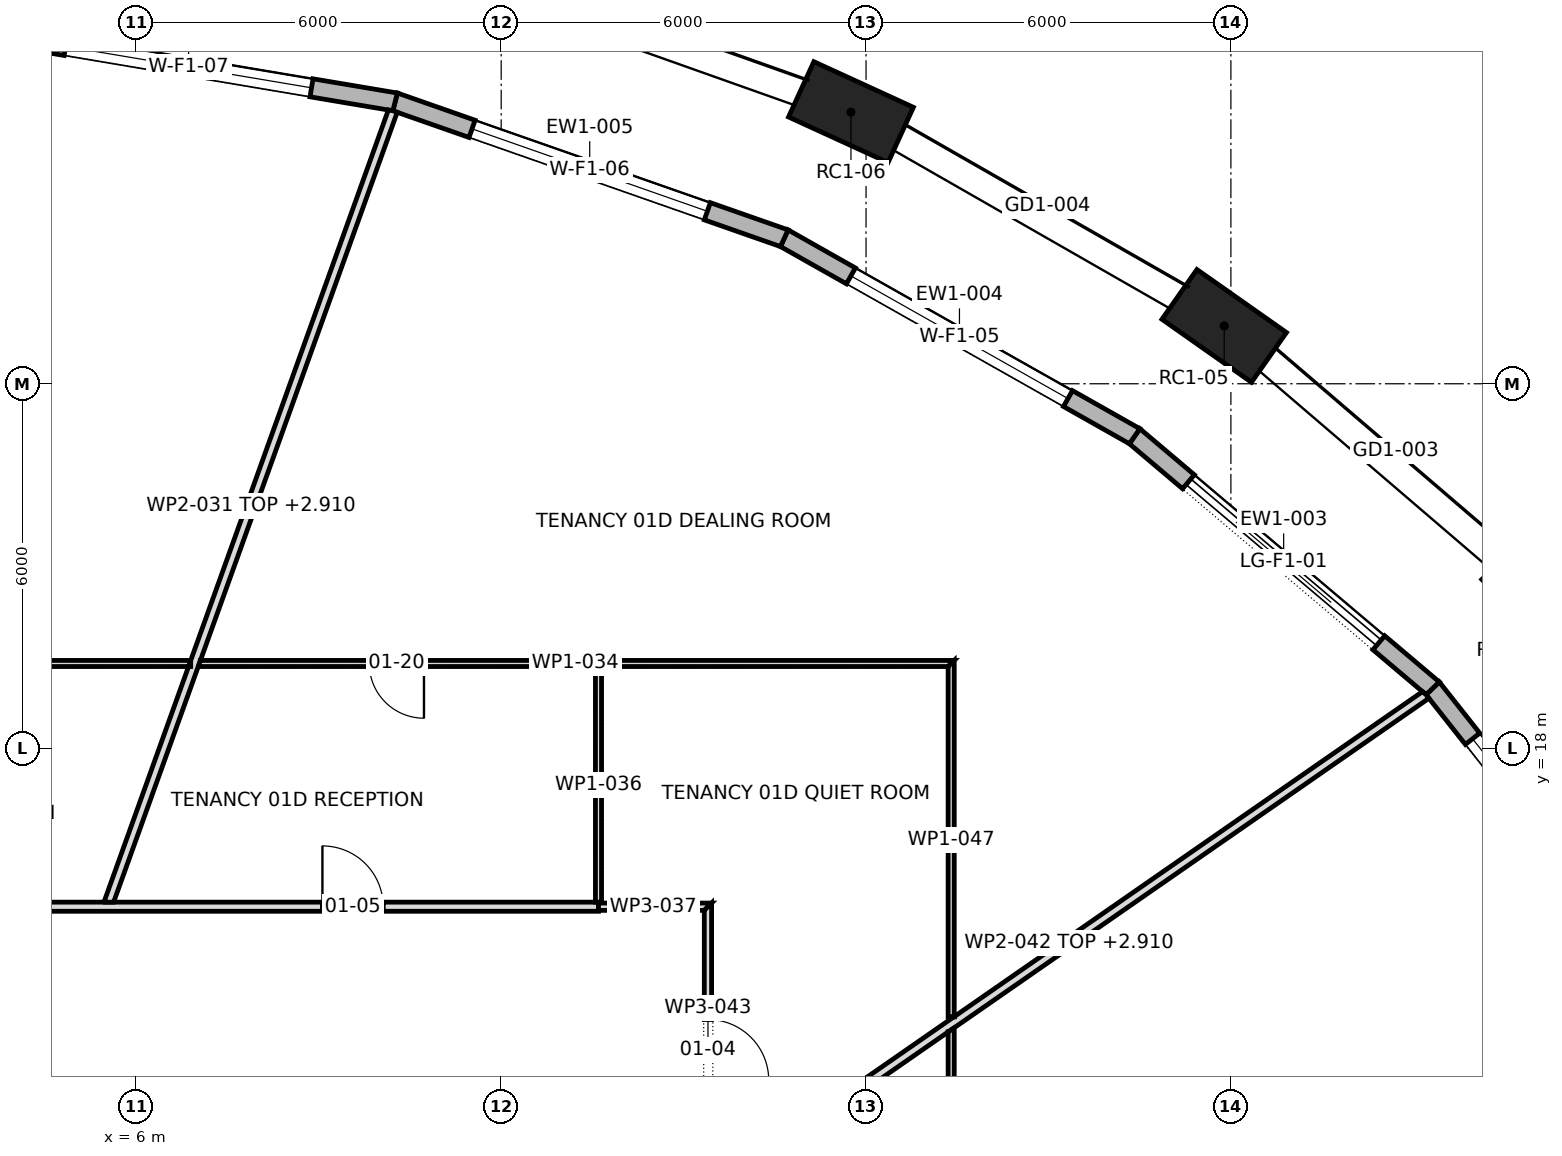
"""IFC4 building model, lengths in metres.
Left out: names, types, materials, properties, quantities, classifications, styles, units other than length and angle.
Written with IfcOpenShell. Run it as: python <this file> out.ifc"""

import sys

from ifc_helpers import new_model, si_unit, direction, frame, frame_2d, origin, origin_2d, place, context, subcontext, project, spatial, polyline, rectangle, outline, extrude, element, fill, save


model = new_model("IFC4")
c1 = context("Model", 3, precision=1e-05, world=origin(), true_north=direction((0.0, 1.0)))
c2 = subcontext(c1, "Body", "Model", "MODEL_VIEW")
j1 = project(units=[si_unit("LENGTHUNIT", "METRE"), si_unit("PLANEANGLEUNIT", "RADIAN")], contexts=[c1])
p1 = place(None, origin())
s1 = spatial("IfcSite", under=j1, at=p1, CompositionType="ELEMENT")
p2 = place(p1, origin())
s2 = spatial("IfcBuilding", under=s1, at=p2, CompositionType="ELEMENT")
p3 = place(p2, frame((0.0, 0.0, 31.9)))
s3 = spatial("IfcBuildingStorey", under=s2, at=p3, CompositionType="ELEMENT", Elevation=31.9)
for number, where, z_axis, x_axis in (
    (1, (29.11, 20.477, 0.0), (0.0, 0.0, 1.0), (-0.692, 0.722, 0.0)),
    (2, (23.89, 24.951, 0.0), (0.0, 0.0, 1.0), (-0.818, 0.575, 0.0)),
    (3, (17.752, 28.467, 0.0), (0.0, 0.0, 1.0), (-0.909, 0.417, 0.0)),
):
    element("IfcColumn", number, at=place(p3, frame(where, z_axis=z_axis, x_axis=x_axis)), inside=s3, PredefinedType="COLUMN", context=c2, shape_type="SweptSolid", body=[
        extrude(rectangle(XDim=1.8, YDim=1.0, at=origin_2d()), origin(), (0.0, 0.0, 1.0), 4.2),
    ])
p4 = place(p3, frame((31.171, 14.115, 0.0), z_axis=(0.0, 0.0, 1.0), x_axis=(-0.619902786528, 0.784678619089, 0.0)))
e4 = element("IfcWall", 4, at=p4, inside=s3, PredefinedType="STANDARD", context=c2, shape_type="SweptSolid", body=[
    extrude(outline(polyline([(-0.016, -0.15), (6.231, -0.15), (6.2, 0.15), (0.016, 0.15), (-0.016, -0.15)])), origin(), (0.0, 0.0, 1.0), 3.9),
])
p5 = place(p4, frame((1.058, 0.0, 0.6)))
e5 = element("IfcOpeningElement", 5, at=p5, cuts=e4, PredefinedType="OPENING", context=c2, shape_type="SweptSolid", body=[
    extrude(rectangle(XDim=4.1, YDim=2.85, at=frame_2d((2.05, 1.425))), frame((0.0, 0.162, 0.0), z_axis=(0.0, -1.0, 0.0), x_axis=(1.0, 0.0, 0.0)), (0.0, 0.0, 1.0), 0.324),
])
p6 = place(p3, frame((27.318, 18.992, 0.0), z_axis=(0.0, 0.0, 1.0), x_axis=(-0.763540615407, 0.645759807223, 0.0)))
e6 = element("IfcWall", 6, at=p6, inside=s3, PredefinedType="STANDARD", context=c2, shape_type="SweptSolid", body=[
    extrude(outline(polyline([(-0.015, -0.15), (6.434, -0.15), (6.406, 0.15), (0.015, 0.15), (-0.015, -0.15)])), origin(), (0.0, 0.0, 1.0), 3.9),
])
p7 = place(p6, frame((1.16, 0.0, 0.0)))
e7 = element("IfcOpeningElement", 7, at=p7, cuts=e6, PredefinedType="OPENING", context=c2, shape_type="SweptSolid", body=[
    extrude(rectangle(XDim=4.1, YDim=3.45, at=frame_2d((2.05, 1.725))), frame((0.0, 0.162, 0.0), z_axis=(0.0, -1.0, 0.0), x_axis=(1.0, 0.0, 0.0)), (0.0, 0.0, 1.0), 0.324),
])
p8 = place(p3, frame((22.417, 23.137, 0.0), z_axis=(0.0, 0.0, 1.0), x_axis=(-0.8705786416, 0.492029296678, 0.0)))
e8 = element("IfcWall", 8, at=p8, inside=s3, PredefinedType="STANDARD", context=c2, shape_type="SweptSolid", body=[
    extrude(outline(polyline([(-0.014, -0.15), (6.631, -0.15), (6.604, 0.15), (0.014, 0.15), (-0.014, -0.15)])), origin(), (0.0, 0.0, 1.0), 3.9),
])
p9 = place(p8, frame((1.259, 0.0, 0.6)))
e9 = element("IfcOpeningElement", 9, at=p9, cuts=e8, PredefinedType="OPENING", context=c2, shape_type="SweptSolid", body=[
    extrude(rectangle(XDim=4.1, YDim=2.85, at=frame_2d((2.05, 1.425))), frame((0.0, 0.162, 0.0), z_axis=(0.0, -1.0, 0.0), x_axis=(1.0, 0.0, 0.0)), (0.0, 0.0, 1.0), 0.324),
])
p10 = place(p3, frame((16.656, 26.393, 0.0), z_axis=(0.0, 0.0, 1.0), x_axis=(-0.943767392455, 0.330610206947, 0.0)))
e10 = element("IfcWall", 10, at=p10, inside=s3, PredefinedType="STANDARD", context=c2, shape_type="SweptSolid", body=[
    extrude(outline(polyline([(-0.013, -0.15), (6.794, -0.15), (6.769, 0.15), (0.013, 0.15), (-0.013, -0.15)])), origin(), (0.0, 0.0, 1.0), 3.9),
])
p11 = place(p10, frame((1.341, 0.0, 0.6)))
e11 = element("IfcOpeningElement", 11, at=p11, cuts=e10, PredefinedType="OPENING", context=c2, shape_type="SweptSolid", body=[
    extrude(rectangle(XDim=4.1, YDim=2.85, at=frame_2d((2.05, 1.425))), frame((0.0, 0.162, 0.0), z_axis=(0.0, -1.0, 0.0), x_axis=(1.0, 0.0, 0.0)), (0.0, 0.0, 1.0), 0.324),
])
p12 = place(p3, frame((10.256, 28.635, 0.0), z_axis=(0.0, 0.0, 1.0), x_axis=(-0.986141805867, 0.165904607291, 0.0)))
e12 = element("IfcWall", 12, at=p12, inside=s3, PredefinedType="STANDARD", context=c2, shape_type="SweptSolid", body=[
    extrude(outline(polyline([(-0.013, -0.15), (6.901, -0.15), (6.876, 0.15), (0.013, 0.15), (-0.013, -0.15)])), origin(), (0.0, 0.0, 1.0), 3.9),
])
p13 = place(p12, frame((1.394, 0.0, 0.6)))
e13 = element("IfcOpeningElement", 13, at=p13, cuts=e12, PredefinedType="OPENING", context=c2, shape_type="SweptSolid", body=[
    extrude(rectangle(XDim=4.1, YDim=2.85, at=frame_2d((2.05, 1.425))), frame((0.0, 0.162, 0.0), z_axis=(0.0, -1.0, 0.0), x_axis=(1.0, 0.0, 0.0)), (0.0, 0.0, 1.0), 0.324),
])
p14 = place(p3, frame((-12.2, 19.4, 0.0), z_axis=(0.0, 0.0, 1.0), x_axis=(1.0, 0.0, 0.0)))
e14 = element("IfcWall", 14, at=p14, inside=s3, PredefinedType="PARTITIONING", context=c2, shape_type="SweptSolid", body=[
    extrude(outline(polyline([(0.063, -0.05), (1.754, -0.05), (3.446, -0.05), (5.137, -0.05), (6.829, -0.05), (8.52, -0.05), (8.52, -0.05), (8.62, -0.05), (8.62, -0.05), (10.36, -0.05), (12.099, -0.05), (13.839, -0.05), (15.579, -0.05), (17.319, -0.05), (19.058, -0.05), (19.094, 0.049), (19.094, 0.05), (17.185, 0.05), (15.275, 0.05), (13.366, 0.05), (11.456, 0.05), (9.547, 0.05), (7.638, 0.05), (5.728, 0.05), (3.819, 0.05), (1.909, 0.05), (0.0, 0.05), (0.0, 0.05), (0.063, -0.05)])), origin(), (0.0, 0.0, 1.0), 3.9),
])
p15 = place(p14, frame((13.415, 0.0, 0.0)))
e15 = element("IfcOpeningElement", 15, at=p15, cuts=e14, PredefinedType="OPENING", context=c2, shape_type="SweptSolid", body=[
    extrude(rectangle(XDim=0.9, YDim=2.1, at=frame_2d((0.45, 1.05))), frame((0.0, 0.062, 0.0), z_axis=(0.0, -1.0, 0.0), x_axis=(1.0, 0.0, 0.0)), (0.0, 0.0, 1.0), 0.124),
])
p16 = place(p3, frame((-9.73, 15.4, 0.0), z_axis=(0.0, 0.0, 1.0), x_axis=(1.0, 0.0, 0.0)))
e16 = element("IfcWall", 16, at=p16, inside=s3, PredefinedType="PARTITIONING", context=c2, shape_type="SweptSolid", body=[
    extrude(rectangle(XDim=23.33, YDim=0.15, at=frame_2d((11.665, 0.0))), origin(), (0.0, 0.0, 1.0), 3.9),
])
p17 = place(p16, frame((18.79, 0.0, 0.0)))
e17 = element("IfcOpeningElement", 17, at=p17, cuts=e16, PredefinedType="OPENING", context=c2, shape_type="SweptSolid", body=[
    extrude(rectangle(XDim=1.0, YDim=2.1, at=frame_2d((0.5, 1.05))), frame((0.0, 0.087, 0.0), z_axis=(0.0, -1.0, 0.0), x_axis=(1.0, 0.0, 0.0)), (0.0, 0.0, 1.0), 0.174),
])
p18 = place(p16, frame((10.175, 0.0, 0.0)))
e18 = element("IfcOpeningElement", 18, at=p18, cuts=e16, PredefinedType="OPENING", context=c2, shape_type="SweptSolid", body=[
    extrude(rectangle(XDim=1.0, YDim=2.1, at=frame_2d((0.5, 1.05))), frame((0.0, 0.087, 0.0), z_axis=(0.0, -1.0, 0.0), x_axis=(1.0, 0.0, 0.0)), (0.0, 0.0, 1.0), 0.174),
])
p19 = place(p16, frame((2.55, 0.0, 0.0)))
e19 = element("IfcOpeningElement", 19, at=p19, cuts=e16, PredefinedType="OPENING", context=c2, shape_type="SweptSolid", body=[
    extrude(rectangle(XDim=1.0, YDim=2.1, at=frame_2d((0.5, 1.05))), frame((0.0, 0.087, 0.0), z_axis=(0.0, -1.0, 0.0), x_axis=(1.0, 0.0, 0.0)), (0.0, 0.0, 1.0), 0.174),
])
p20 = place(p3, frame((5.538, 15.45, 0.0), z_axis=(0.0, 0.0, 1.0), x_axis=(0.337914385466, 0.94117685272, 0.0)))
e20 = element("IfcWall", 20, at=p20, inside=s3, PredefinedType="PARTITIONING", context=c2, shape_type="SweptSolid", body=[
    extrude(outline(polyline([(0.053, -0.075), (1.46, -0.075), (2.867, -0.075), (4.274, -0.075), (4.277, -0.074), (4.277, -0.075), (6.192, -0.075), (8.108, -0.075), (10.023, -0.075), (11.939, -0.075), (13.854, -0.075), (13.854, -0.063), (13.854, 0.001), (13.841, 0.075), (11.917, 0.075), (9.993, 0.075), (8.07, 0.075), (6.146, 0.075), (4.222, 0.075), (4.129, 0.042), (4.117, 0.075), (2.745, 0.075), (1.372, 0.075), (0.0, 0.075), (0.0, 0.074), (0.053, -0.075)])), origin(), (0.0, 0.0, 1.0), 2.91),
])
p21 = place(p3, frame((7.018, 19.4, 0.0), z_axis=(0.0, 0.0, 1.0), x_axis=(1.0, 0.0, 0.0)))
e21 = element("IfcWall", 21, at=p21, inside=s3, PredefinedType="PARTITIONING", context=c2, shape_type="SweptSolid", body=[
    extrude(outline(polyline([(0.0, -0.05), (1.633, -0.05), (3.266, -0.05), (4.899, -0.05), (6.532, -0.05), (6.532, -0.05), (6.632, -0.05), (6.632, -0.05), (8.532, -0.05), (10.432, -0.05), (12.332, -0.05), (12.332, -0.05), (12.432, 0.05), (10.661, 0.05), (8.89, 0.05), (7.119, 0.05), (5.348, 0.05), (3.577, 0.05), (1.807, 0.05), (0.036, 0.05), (0.0, -0.049), (0.0, -0.05)])), origin(), (0.0, 0.0, 1.0), 3.9),
])
p22 = place(p21, frame((2.812, 0.0, 0.0)))
e22 = element("IfcOpeningElement", 22, at=p22, cuts=e21, PredefinedType="OPENING", context=c2, shape_type="SweptSolid", body=[
    extrude(rectangle(XDim=0.9, YDim=2.1, at=frame_2d((0.45, 1.05))), frame((0.0, 0.062, 0.0), z_axis=(0.0, -1.0, 0.0), x_axis=(1.0, 0.0, 0.0)), (0.0, 0.0, 1.0), 0.124),
])
p23 = place(p3, frame((13.6, 15.46, 0.0), z_axis=(0.0, 0.0, 1.0), x_axis=(0.0, 1.0, 0.0)))
e23 = element("IfcWall", 23, at=p23, inside=s3, PredefinedType="PARTITIONING", context=c2, shape_type="SweptSolid", body=[
    extrude(outline(polyline([(0.0, -0.05), (1.945, -0.05), (3.89, -0.05), (3.89, 0.05), (1.952, 0.05), (0.015, 0.05), (0.015, 0.0), (0.0, 0.0), (0.0, -0.05)])), origin(), (0.0, 0.0, 1.0), 3.9),
])
p24 = place(p3, frame((13.6, 15.4, 0.0), z_axis=(0.0, 0.0, 1.0), x_axis=(1.0, 0.0, 0.0)))
e24 = element("IfcWall", 24, at=p24, inside=s3, PredefinedType="PARTITIONING", context=c2, shape_type="SweptSolid", body=[
    extrude(outline(polyline([(0.0, -0.06), (1.74, -0.06), (1.86, 0.06), (0.0, 0.06), (0.0, -0.06)])), origin(), (0.0, 0.0, 1.0), 3.9),
])
p25 = place(p3, frame((15.433, 10.712, 0.0), z_axis=(0.0, 0.0, 1.0), x_axis=(0.82152236589, 0.570176290583, 0.0)))
e25 = element("IfcWall", 25, at=p25, inside=s3, PredefinedType="PARTITIONING", context=c2, shape_type="SweptSolid", body=[
    extrude(outline(polyline([(0.0, -0.075), (1.572, -0.075), (3.144, -0.075), (4.716, -0.075), (4.718, -0.073), (4.721, -0.075), (6.645, -0.075), (8.569, -0.075), (10.493, -0.075), (12.417, -0.075), (14.341, -0.075), (14.341, -0.074), (14.336, 0.0), (14.316, 0.075), (12.441, 0.075), (10.567, 0.075), (8.692, 0.075), (6.817, 0.075), (4.942, 0.075), (4.941, 0.073), (4.939, 0.075), (3.321, 0.075), (1.703, 0.075), (0.085, 0.075), (0.01, -0.034), (0.022, -0.042), (0.0, -0.074), (0.0, -0.075)])), origin(), (0.0, 0.0, 1.0), 2.91),
])
p26 = place(p3, frame((15.4, 15.46, 0.0), z_axis=(0.0, 0.0, 1.0), x_axis=(0.0, -1.0, 0.0)))
e26 = element("IfcWall", 26, at=p26, inside=s3, PredefinedType="PARTITIONING", context=c2, shape_type="SweptSolid", body=[
    extrude(outline(polyline([(4.77, 0.06), (3.18, 0.06), (1.59, 0.06), (0.0, 0.06), (0.12, -0.06), (1.67, -0.06), (3.22, -0.06), (4.77, -0.06), (4.77, 0.06)])), origin(), (0.0, 0.0, 1.0), 3.9),
])
p27 = place(p26, frame((1.915, 0.0, 0.0)))
e27 = element("IfcOpeningElement", 27, at=p27, cuts=e26, PredefinedType="OPENING", context=c2, shape_type="SweptSolid", body=[
    extrude(rectangle(XDim=1.0, YDim=2.1, at=frame_2d((0.5, 1.05))), frame((0.0, 0.072, 0.0), z_axis=(0.0, -1.0, 0.0), x_axis=(1.0, 0.0, 0.0)), (0.0, 0.0, 1.0), 0.144),
])
p28 = place(p3, frame((19.4, 13.409, 0.0), z_axis=(0.0, 0.0, 1.0), x_axis=(0.0, -1.0, 0.0)))
e28 = element("IfcWall", 28, at=p28, inside=s3, PredefinedType="PARTITIONING", context=c2, shape_type="SweptSolid", body=[
    extrude(outline(polyline([(8.367, -0.05), (8.367, -0.048), (8.342, 0.05), (6.673, 0.05), (5.005, 0.05), (3.337, 0.05), (1.668, 0.05), (0.0, 0.05), (0.0, 0.049), (0.069, -0.05), (1.729, -0.05), (3.388, -0.05), (5.048, -0.05), (6.707, -0.05), (8.367, -0.05)])), origin(), (0.0, 0.0, 1.0), 3.9),
])
p29 = place(p28, frame((3.734, 0.0, 0.0)))
e29 = element("IfcOpeningElement", 29, at=p29, cuts=e28, PredefinedType="OPENING", context=c2, shape_type="SweptSolid", body=[
    extrude(rectangle(XDim=0.9, YDim=2.1, at=frame_2d((0.45, 1.05))), frame((0.0, 0.062, 0.0), z_axis=(0.0, -1.0, 0.0), x_axis=(1.0, 0.0, 0.0)), (0.0, 0.0, 1.0), 0.124),
])
p30 = place(p3, frame((19.4, 19.45, 0.0), z_axis=(0.0, 0.0, 1.0), x_axis=(0.0, -1.0, 0.0)))
e30 = element("IfcWall", 30, at=p30, inside=s3, PredefinedType="PARTITIONING", context=c2, shape_type="SweptSolid", body=[
    extrude(outline(polyline([(5.86, 0.05), (3.906, 0.05), (1.953, 0.05), (0.0, 0.05), (0.1, -0.05), (2.02, -0.05), (3.94, -0.05), (5.86, -0.05), (5.86, 0.05)])), origin(), (0.0, 0.0, 1.0), 3.9),
])
p31 = place(p5, origin())
e31 = element("IfcWindow", 31, at=p31, inside=s3, PartitioningType="TRIPLE_PANEL_VERTICAL", PredefinedType="WINDOW", context=c2, shape_type="SweptSolid", body=[
    extrude(rectangle(XDim=4.1, YDim=2.85, at=frame_2d((2.05, 1.425))), frame((0.0, 0.03, 0.0), z_axis=(0.0, -1.0, 0.0), x_axis=(1.0, 0.0, 0.0)), (0.0, 0.0, 1.0), 0.06),
])
fill(e5, e31)
p32 = place(p7, origin())
e32 = element("IfcDoor", 32, at=p32, inside=s3, OperationType="DOUBLE_DOOR_SLIDING", PredefinedType="DOOR", context=c2, shape_type="SweptSolid", body=[
    extrude(rectangle(XDim=4.1, YDim=3.45, at=frame_2d((2.05, 1.725))), frame((0.0, 0.025, 0.0), z_axis=(0.0, -1.0, 0.0), x_axis=(1.0, 0.0, 0.0)), (0.0, 0.0, 1.0), 0.05),
])
fill(e7, e32)
p33 = place(p9, origin())
e33 = element("IfcWindow", 33, at=p33, inside=s3, PartitioningType="TRIPLE_PANEL_VERTICAL", PredefinedType="WINDOW", context=c2, shape_type="SweptSolid", body=[
    extrude(rectangle(XDim=4.1, YDim=2.85, at=frame_2d((2.05, 1.425))), frame((0.0, 0.03, 0.0), z_axis=(0.0, -1.0, 0.0), x_axis=(1.0, 0.0, 0.0)), (0.0, 0.0, 1.0), 0.06),
])
fill(e9, e33)
p34 = place(p11, origin())
e34 = element("IfcWindow", 34, at=p34, inside=s3, PartitioningType="TRIPLE_PANEL_VERTICAL", PredefinedType="WINDOW", context=c2, shape_type="SweptSolid", body=[
    extrude(rectangle(XDim=4.1, YDim=2.85, at=frame_2d((2.05, 1.425))), frame((0.0, 0.03, 0.0), z_axis=(0.0, -1.0, 0.0), x_axis=(1.0, 0.0, 0.0)), (0.0, 0.0, 1.0), 0.06),
])
fill(e11, e34)
p35 = place(p13, origin())
e35 = element("IfcWindow", 35, at=p35, inside=s3, PartitioningType="TRIPLE_PANEL_VERTICAL", PredefinedType="WINDOW", context=c2, shape_type="SweptSolid", body=[
    extrude(rectangle(XDim=4.1, YDim=2.85, at=frame_2d((2.05, 1.425))), frame((0.0, 0.03, 0.0), z_axis=(0.0, -1.0, 0.0), x_axis=(1.0, 0.0, 0.0)), (0.0, 0.0, 1.0), 0.06),
])
fill(e13, e35)
p36 = place(p27, origin())
e36 = element("IfcDoor", 36, at=p36, inside=s3, OperationType="SINGLE_SWING_LEFT", PredefinedType="DOOR", context=c2, shape_type="SweptSolid", body=[
    extrude(rectangle(XDim=1.0, YDim=2.1, at=frame_2d((0.5, 1.05))), frame((0.0, 0.025, 0.0), z_axis=(0.0, -1.0, 0.0), x_axis=(1.0, 0.0, 0.0)), (0.0, 0.0, 1.0), 0.05),
])
fill(e27, e36)
p37 = place(p17, origin())
e37 = element("IfcDoor", 37, at=p37, inside=s3, OperationType="SINGLE_SWING_RIGHT", PredefinedType="DOOR", context=c2, shape_type="SweptSolid", body=[
    extrude(rectangle(XDim=1.0, YDim=2.1, at=frame_2d((0.5, 1.05))), frame((0.0, 0.025, 0.0), z_axis=(0.0, -1.0, 0.0), x_axis=(1.0, 0.0, 0.0)), (0.0, 0.0, 1.0), 0.05),
])
fill(e17, e37)
p38 = place(p22, frame((0.9, 0.0, 0.0), z_axis=(0.0, 0.0, 1.0), x_axis=(-1.0, 0.0, 0.0)))
e38 = element("IfcDoor", 38, at=p38, inside=s3, OperationType="SINGLE_SWING_RIGHT", PredefinedType="DOOR", context=c2, shape_type="SweptSolid", body=[
    extrude(rectangle(XDim=0.9, YDim=2.1, at=frame_2d((0.45, 1.05))), frame((0.0, 0.025, 0.0), z_axis=(0.0, -1.0, 0.0), x_axis=(1.0, 0.0, 0.0)), (0.0, 0.0, 1.0), 0.05),
])
fill(e22, e38)
save(model, sys.argv[1])
